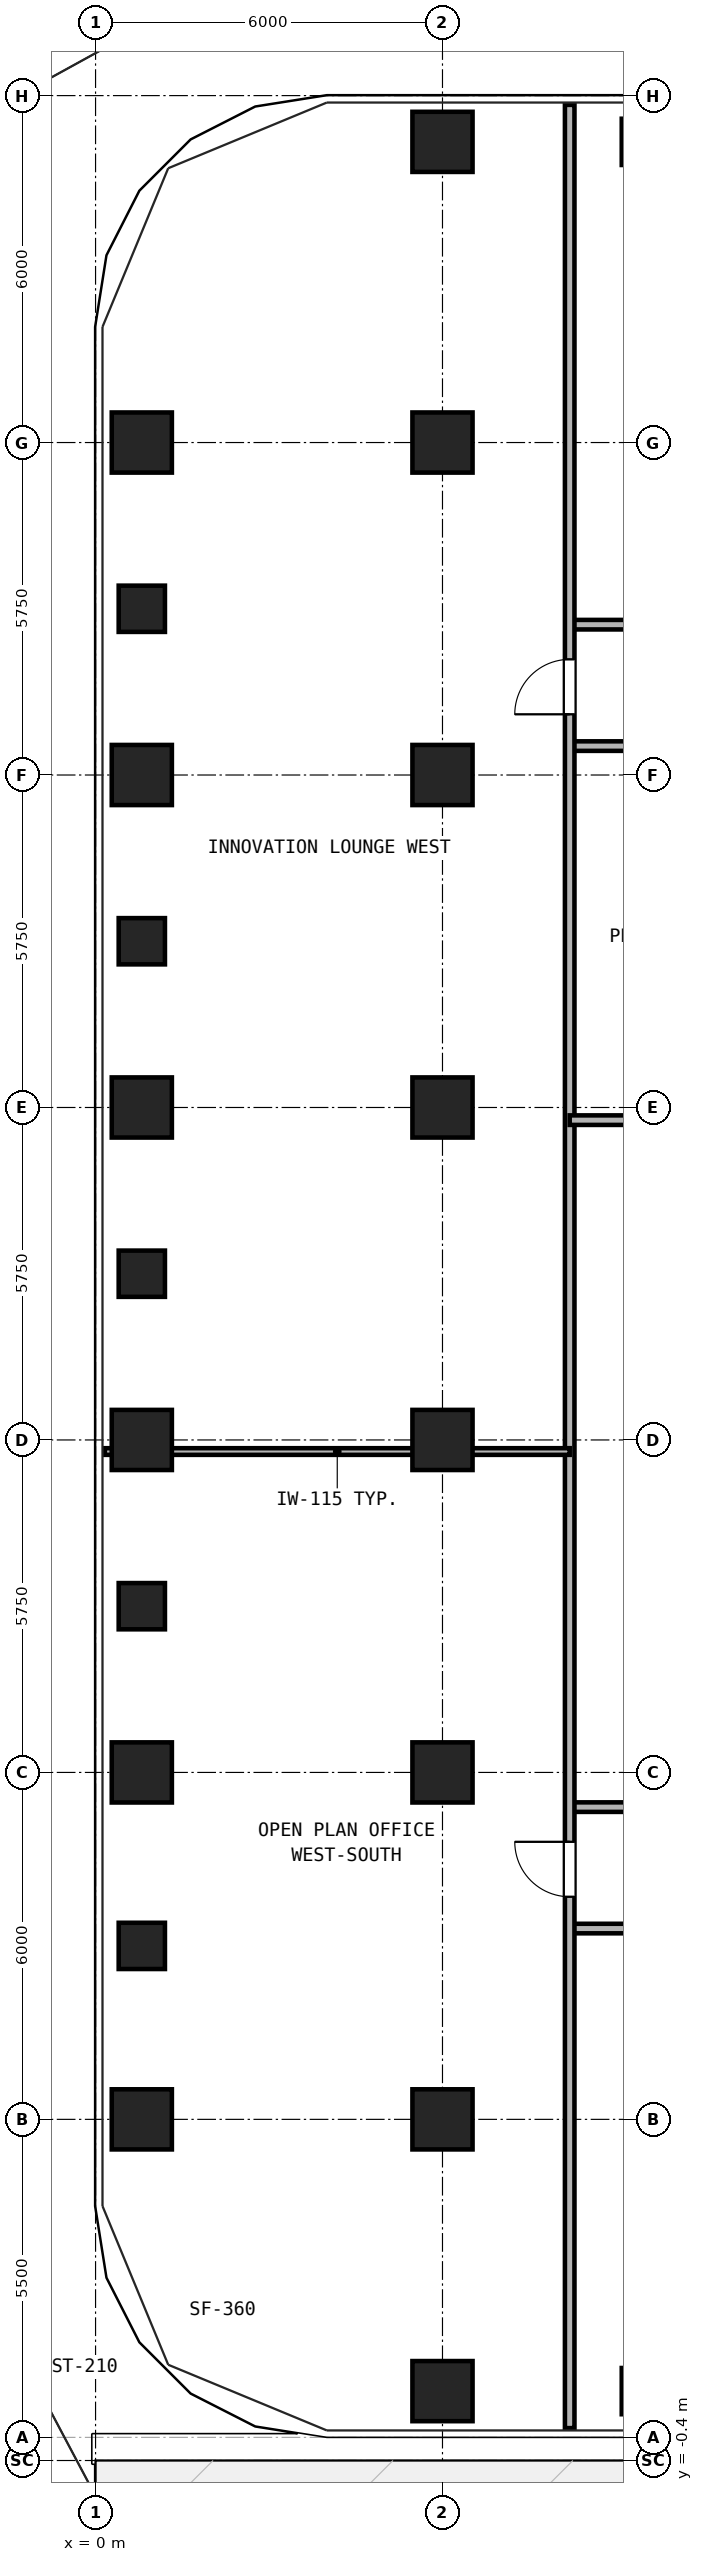
"""IFC4 building model, lengths in metres.
Left out: names, types, materials, properties, quantities, classifications, styles, units other than length and angle.
Written with IfcOpenShell. Run it as: python <this file> out.ifc"""

import sys

from ifc_helpers import new_model, si_unit, direction, frame, frame_2d, origin, origin_2d, place, context, subcontext, project, spatial, rectangle, hollow_rectangle, extrude, source, transform, mapped, element, fill, save


model = new_model("IFC4")
c1 = context("Model", 3, precision=1e-05, world=origin(), true_north=direction((0.0, 1.0)))
c2 = subcontext(c1, "Body", "Model", "MODEL_VIEW")
j1 = project(units=[si_unit("LENGTHUNIT", "METRE"), si_unit("PLANEANGLEUNIT", "RADIAN")], contexts=[c1])
p1 = place(None, origin())
s1 = spatial("IfcSite", under=j1, at=p1, CompositionType="ELEMENT")
p2 = place(p1, origin())
s2 = spatial("IfcBuilding", under=s1, at=p2, CompositionType="ELEMENT")
p3 = place(p2, frame((0.0, 0.0, 22.5)))
s3 = spatial("IfcBuildingStorey", under=s2, at=p3, CompositionType="ELEMENT", Elevation=22.5)
m1 = source(origin(), c2, "Body", "SweptSolid", [
    extrude(hollow_rectangle(XDim=1.04, YDim=1.04, WallThickness=0.065, at=origin_2d()), origin(), (0.0, 0.0, 1.0), 3.32),
])
for number, where, z_axis, x_axis in (
    (1, (6.0, 0.8, 0.0), (0.0, 0.0, 1.0), (1.0, 0.0, 0.0)),
    (2, (6.0, 39.7, 0.0), (0.0, 0.0, 1.0), (1.0, 0.0, 0.0)),
    (3, (0.8, 5.5, 0.0), (0.0, 0.0, 1.0), (1.0, 0.0, 0.0)),
    (4, (0.8, 11.5, 0.0), (0.0, 0.0, 1.0), (1.0, 0.0, 0.0)),
    (5, (0.8, 17.25, 0.0), (0.0, 0.0, 1.0), (1.0, 0.0, 0.0)),
    (6, (0.8, 23.0, 0.0), (0.0, 0.0, 1.0), (1.0, 0.0, 0.0)),
    (7, (0.8, 28.75, 0.0), (0.0, 0.0, 1.0), (1.0, 0.0, 0.0)),
    (8, (0.8, 34.5, 0.0), (0.0, 0.0, 1.0), (1.0, 0.0, 0.0)),
    (9, (6.0, 5.5, 0.0), (0.0, 0.0, 1.0), (1.0, 0.0, 0.0)),
    (10, (6.0, 11.5, 0.0), (0.0, 0.0, 1.0), (1.0, 0.0, 0.0)),
    (11, (6.0, 17.25, 0.0), (0.0, 0.0, 1.0), (1.0, 0.0, 0.0)),
    (12, (6.0, 23.0, 0.0), (0.0, 0.0, 1.0), (1.0, 0.0, 0.0)),
    (13, (6.0, 28.75, 0.0), (0.0, 0.0, 1.0), (1.0, 0.0, 0.0)),
    (14, (6.0, 34.5, 0.0), (0.0, 0.0, 1.0), (1.0, 0.0, 0.0)),
):
    element("IfcColumn", number, at=place(p3, frame(where, z_axis=z_axis, x_axis=x_axis)), inside=s3, PredefinedType="COLUMN", context=c2, shape_type="MappedRepresentation", body=[
        mapped(m1, transform((0.0, 0.0, 0.0), x_axis=(1.0, 0.0, 0.0), y_axis=(0.0, 1.0, 0.0), z_axis=(0.0, 0.0, 1.0), scale=1.0)),
    ])
m2 = source(origin(), c2, "Body", "SweptSolid", [
    extrude(hollow_rectangle(XDim=0.8, YDim=0.8, WallThickness=0.045, at=origin_2d()), origin(), (0.0, 0.0, 1.0), 3.68),
])
for number, where, z_axis, x_axis in (
    (15, (9.5, 0.8, -0.36), (0.0, 0.0, 1.0), (1.0, 0.0, 0.0)),
    (16, (9.5, 39.7, -0.36), (0.0, 0.0, 1.0), (1.0, 0.0, 0.0)),
    (17, (0.8, 8.5, -0.36), (0.0, 0.0, 1.0), (1.0, 0.0, 0.0)),
    (18, (0.8, 14.375, -0.36), (0.0, 0.0, 1.0), (1.0, 0.0, 0.0)),
    (19, (0.8, 20.125, -0.36), (0.0, 0.0, 1.0), (1.0, 0.0, 0.0)),
    (20, (0.8, 25.875, -0.36), (0.0, 0.0, 1.0), (1.0, 0.0, 0.0)),
    (21, (0.8, 31.625, -0.36), (0.0, 0.0, 1.0), (1.0, 0.0, 0.0)),
):
    element("IfcColumn", number, at=place(p3, frame(where, z_axis=z_axis, x_axis=x_axis)), inside=s3, PredefinedType="COLUMN", context=c2, shape_type="MappedRepresentation", body=[
        mapped(m2, transform((0.0, 0.0, 0.0), x_axis=(1.0, 0.0, 0.0), y_axis=(0.0, 1.0, 0.0), z_axis=(0.0, 0.0, 1.0), scale=1.0)),
    ])
p4 = place(p3, frame((8.2, 8.8, 0.0), z_axis=(0.0, 0.0, 1.0), x_axis=(1.0, 0.0, 0.0)))
e22 = element("IfcWall", 22, at=p4, inside=s3, PredefinedType="PARTITIONING", context=c2, shape_type="SweptSolid", body=[
    extrude(rectangle(XDim=30.6, YDim=0.165, at=frame_2d((15.3, 0.0))), origin(), (0.0, 0.0, 1.0), 3.32),
])
p5 = place(p4, frame((7.15, 0.0, 0.0)))
e23 = element("IfcOpeningElement", 23, at=p5, cuts=e22, PredefinedType="OPENING", context=c2, shape_type="SweptSolid", body=[
    extrude(rectangle(XDim=0.95, YDim=2.15, at=frame_2d((0.475, 1.075))), frame((0.0, 0.093, 0.0), z_axis=(0.0, -1.0, 0.0), x_axis=(1.0, 0.0, 0.0)), (0.0, 0.0, 1.0), 0.185),
])
p6 = place(p4, frame((19.05, 0.0, 0.0)))
e24 = element("IfcOpeningElement", 24, at=p6, cuts=e22, PredefinedType="OPENING", context=c2, shape_type="SweptSolid", body=[
    extrude(rectangle(XDim=0.95, YDim=2.15, at=frame_2d((0.475, 1.075))), frame((0.0, 0.093, 0.0), z_axis=(0.0, -1.0, 0.0), x_axis=(1.0, 0.0, 0.0)), (0.0, 0.0, 1.0), 0.185),
])
p7 = place(p4, frame((24.3, 0.0, 0.0)))
e25 = element("IfcOpeningElement", 25, at=p7, cuts=e22, PredefinedType="OPENING", context=c2, shape_type="SweptSolid", body=[
    extrude(rectangle(XDim=0.95, YDim=2.15, at=frame_2d((0.475, 1.075))), frame((0.0, 0.093, 0.0), z_axis=(0.0, -1.0, 0.0), x_axis=(1.0, 0.0, 0.0)), (0.0, 0.0, 1.0), 0.185),
])
p8 = place(p4, frame((26.5, 0.0, 0.0)))
e26 = element("IfcOpeningElement", 26, at=p8, cuts=e22, PredefinedType="OPENING", context=c2, shape_type="SweptSolid", body=[
    extrude(rectangle(XDim=0.92, YDim=2.1, at=frame_2d((0.46, 1.05))), frame((0.0, 0.093, 0.0), z_axis=(0.0, -1.0, 0.0), x_axis=(1.0, 0.0, 0.0)), (0.0, 0.0, 1.0), 0.185),
])
p9 = place(p4, frame((28.9, 0.0, 0.0)))
e27 = element("IfcOpeningElement", 27, at=p9, cuts=e22, PredefinedType="OPENING", context=c2, shape_type="SweptSolid", body=[
    extrude(rectangle(XDim=0.92, YDim=2.1, at=frame_2d((0.46, 1.05))), frame((0.0, 0.093, 0.0), z_axis=(0.0, -1.0, 0.0), x_axis=(1.0, 0.0, 0.0)), (0.0, 0.0, 1.0), 0.185),
])
p10 = place(p3, frame((8.2, 31.35, 0.0), z_axis=(0.0, 0.0, 1.0), x_axis=(1.0, 0.0, 0.0)))
e28 = element("IfcWall", 28, at=p10, inside=s3, PredefinedType="PARTITIONING", context=c2, shape_type="SweptSolid", body=[
    extrude(rectangle(XDim=30.6, YDim=0.165, at=frame_2d((15.3, 0.0))), origin(), (0.0, 0.0, 1.0), 3.32),
])
p11 = place(p10, frame((7.4, 0.0, 0.0)))
e29 = element("IfcOpeningElement", 29, at=p11, cuts=e28, PredefinedType="OPENING", context=c2, shape_type="SweptSolid", body=[
    extrude(rectangle(XDim=0.95, YDim=2.15, at=frame_2d((0.475, 1.075))), frame((0.0, 0.093, 0.0), z_axis=(0.0, -1.0, 0.0), x_axis=(1.0, 0.0, 0.0)), (0.0, 0.0, 1.0), 0.185),
])
p12 = place(p10, frame((22.7, 0.0, 0.0)))
e30 = element("IfcOpeningElement", 30, at=p12, cuts=e28, PredefinedType="OPENING", context=c2, shape_type="SweptSolid", body=[
    extrude(rectangle(XDim=0.95, YDim=2.15, at=frame_2d((0.475, 1.075))), frame((0.0, 0.093, 0.0), z_axis=(0.0, -1.0, 0.0), x_axis=(1.0, 0.0, 0.0)), (0.0, 0.0, 1.0), 0.185),
])
for number, where, z_axis, x_axis in (
    (31, (8.2, 10.9, 0.0), (0.0, 0.0, 1.0), (1.0, 0.0, 0.0)),
    (32, (8.2, 29.25, 0.0), (0.0, 0.0, 1.0), (1.0, 0.0, 0.0)),
):
    element("IfcWall", number, at=place(p3, frame(where, z_axis=z_axis, x_axis=x_axis)), inside=s3, PredefinedType="PARTITIONING", context=c2, shape_type="SweptSolid", body=[
        extrude(rectangle(XDim=8.1, YDim=0.165, at=frame_2d((4.05, 0.0))), origin(), (0.0, 0.0, 1.0), 3.32),
    ])
p13 = place(p3, frame((8.2, 0.16, 0.0), z_axis=(0.0, 0.0, 1.0), x_axis=(0.0, 1.0, 0.0)))
e33 = element("IfcWall", 33, at=p13, inside=s3, PredefinedType="PARTITIONING", context=c2, shape_type="SweptSolid", body=[
    extrude(rectangle(XDim=40.18, YDim=0.165, at=frame_2d((20.09, 0.0))), origin(), (0.0, 0.0, 1.0), 3.32),
])
p14 = place(p13, frame((9.19, 0.0, 0.0)))
e34 = element("IfcOpeningElement", 34, at=p14, cuts=e33, PredefinedType="OPENING", context=c2, shape_type="SweptSolid", body=[
    extrude(rectangle(XDim=0.95, YDim=2.15, at=frame_2d((0.475, 1.075))), frame((0.0, 0.093, 0.0), z_axis=(0.0, -1.0, 0.0), x_axis=(1.0, 0.0, 0.0)), (0.0, 0.0, 1.0), 0.185),
])
p15 = place(p13, frame((29.64, 0.0, 0.0)))
e35 = element("IfcOpeningElement", 35, at=p15, cuts=e33, PredefinedType="OPENING", context=c2, shape_type="SweptSolid", body=[
    extrude(rectangle(XDim=0.95, YDim=2.15, at=frame_2d((0.475, 1.075))), frame((0.0, 0.093, 0.0), z_axis=(0.0, -1.0, 0.0), x_axis=(1.0, 0.0, 0.0)), (0.0, 0.0, 1.0), 0.185),
])
p16 = place(p3, frame((0.16, 17.05, 0.0), z_axis=(0.0, 0.0, 1.0), x_axis=(1.0, 0.0, 0.0)))
e36 = element("IfcWall", 36, at=p16, inside=s3, PredefinedType="PARTITIONING", context=c2, shape_type="SweptSolid", body=[
    extrude(rectangle(XDim=8.04, YDim=0.115, at=frame_2d((4.02, 0.0))), origin(), (0.0, 0.0, 1.0), 2.539),
])
p17 = place(p3, frame((8.2, 22.781, 0.0), z_axis=(0.0, 0.0, 1.0), x_axis=(1.0, 0.0, 0.0)))
e37 = element("IfcWall", 37, at=p17, inside=s3, PredefinedType="PARTITIONING", context=c2, shape_type="SweptSolid", body=[
    extrude(rectangle(XDim=8.1, YDim=0.165, at=frame_2d((4.05, 0.0))), origin(), (0.0, 0.0, 1.0), 2.539),
])
p18 = place(p14, frame((0.95, 0.0, 0.0), z_axis=(0.0, 0.0, 1.0), x_axis=(-1.0, 0.0, 0.0)))
e38 = element("IfcDoor", 38, at=p18, inside=s3, OperationType="SINGLE_SWING_RIGHT", PredefinedType="DOOR", context=c2, shape_type="SweptSolid", body=[
    extrude(rectangle(XDim=0.95, YDim=2.15, at=frame_2d((0.475, 1.075))), frame((0.0, 0.025, 0.0), z_axis=(0.0, -1.0, 0.0), x_axis=(1.0, 0.0, 0.0)), (0.0, 0.0, 1.0), 0.05),
])
fill(e34, e38)
p19 = place(p15, frame((0.95, 0.0, 0.0), z_axis=(0.0, 0.0, 1.0), x_axis=(-1.0, 0.0, 0.0)))
e39 = element("IfcDoor", 39, at=p19, inside=s3, OperationType="SINGLE_SWING_LEFT", PredefinedType="DOOR", context=c2, shape_type="SweptSolid", body=[
    extrude(rectangle(XDim=0.95, YDim=2.15, at=frame_2d((0.475, 1.075))), frame((0.0, 0.025, 0.0), z_axis=(0.0, -1.0, 0.0), x_axis=(1.0, 0.0, 0.0)), (0.0, 0.0, 1.0), 0.05),
])
fill(e35, e39)
save(model, sys.argv[1])
